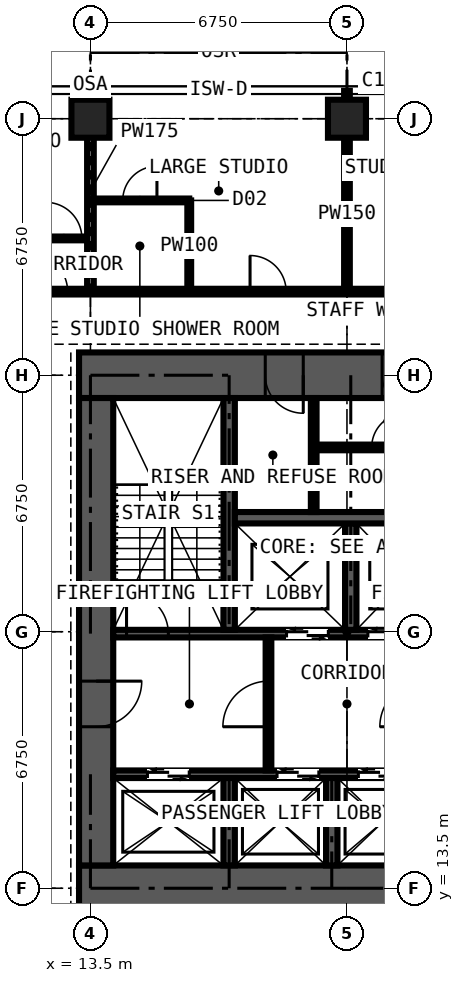
"""IFC4 building model, lengths in metres.
Left out: names, types, materials, properties, quantities, classifications, styles, units other than length and angle.
Written with IfcOpenShell. Run it as: python <this file> out.ifc"""

import sys

from ifc_helpers import new_model, si_unit, direction, frame, frame_2d, origin, origin_2d, place, context, subcontext, project, spatial, rectangle, extrude, element, fill, save


model = new_model("IFC4")
c1 = context("Model", 3, precision=1e-05, world=origin(), true_north=direction((0.0, 1.0)))
c2 = subcontext(c1, "Body", "Model", "MODEL_VIEW")
j1 = project(units=[si_unit("LENGTHUNIT", "METRE"), si_unit("PLANEANGLEUNIT", "RADIAN")], contexts=[c1])
p1 = place(None, origin())
s1 = spatial("IfcSite", under=j1, at=p1, CompositionType="ELEMENT")
p2 = place(p1, origin())
s2 = spatial("IfcBuilding", under=s1, at=p2, CompositionType="ELEMENT")
p3 = place(p2, frame((0.0, 0.0, 229.5)))
s3 = spatial("IfcBuildingStorey", under=s2, at=p3, CompositionType="ELEMENT", Elevation=229.5)
for number, where, z_axis, x_axis in (
    (1, (13.5, 33.75, 0.0), (0.0, 0.0, 1.0), (1.0, 0.0, 0.0)),
    (2, (20.25, 33.75, 0.0), (0.0, 0.0, 1.0), (1.0, 0.0, 0.0)),
):
    element("IfcColumn", number, at=place(p3, frame(where, z_axis=z_axis, x_axis=x_axis)), inside=s3, PredefinedType="COLUMN", context=c2, shape_type="SweptSolid", body=[
        extrude(rectangle(XDim=1.0, YDim=1.0, at=origin_2d()), origin(), (0.0, 0.0, 1.0), 3.6),
    ])
p4 = place(p3, frame((13.2, 13.5, 0.0), z_axis=(0.0, 0.0, 1.0), x_axis=(1.0, 0.0, 0.0)))
e3 = element("IfcWall", 3, at=p4, inside=s3, PredefinedType="SHEAR", context=c2, shape_type="SweptSolid", body=[
    extrude(rectangle(XDim=14.1, YDim=1.2, at=frame_2d((7.05, 0.0))), origin(), (0.0, 0.0, 1.0), 3.6),
])
p5 = place(p3, frame((27.3, 27.0, 0.0), z_axis=(0.0, 0.0, 1.0), x_axis=(-1.0, 0.0, 0.0)))
e4 = element("IfcWall", 4, at=p5, inside=s3, PredefinedType="SHEAR", context=c2, shape_type="SweptSolid", body=[
    extrude(rectangle(XDim=14.1, YDim=1.2, at=frame_2d((7.05, 0.0))), origin(), (0.0, 0.0, 1.0), 3.6),
])
p6 = place(p5, frame((5.225, 0.0, 0.0)))
e5 = element("IfcOpeningElement", 5, at=p6, cuts=e4, PredefinedType="OPENING", context=c2, shape_type="SweptSolid", body=[
    extrude(rectangle(XDim=0.9, YDim=2.2, at=frame_2d((0.45, 1.1))), frame((0.0, 0.61, 0.0), z_axis=(0.0, -1.0, 0.0), x_axis=(1.0, 0.0, 0.0)), (0.0, 0.0, 1.0), 1.22),
])
p7 = place(p5, frame((8.2, 0.0, 0.0)))
e6 = element("IfcOpeningElement", 6, at=p7, cuts=e4, PredefinedType="OPENING", context=c2, shape_type="SweptSolid", body=[
    extrude(rectangle(XDim=1.0, YDim=2.2, at=frame_2d((0.5, 1.1))), frame((0.0, 0.61, 0.0), z_axis=(0.0, -1.0, 0.0), x_axis=(1.0, 0.0, 0.0)), (0.0, 0.0, 1.0), 1.22),
])
p8 = place(p3, frame((13.65, 26.4, 0.0), z_axis=(0.0, 0.0, 1.0), x_axis=(0.0, -1.0, 0.0)))
e7 = element("IfcWall", 7, at=p8, inside=s3, PredefinedType="SHEAR", context=c2, shape_type="SweptSolid", body=[
    extrude(rectangle(XDim=12.3, YDim=0.9, at=frame_2d((6.15, 0.0))), origin(), (0.0, 0.0, 1.0), 3.6),
])
p9 = place(p8, frame((7.45, 0.0, 0.0)))
e8 = element("IfcOpeningElement", 8, at=p9, cuts=e7, PredefinedType="OPENING", context=c2, shape_type="SweptSolid", body=[
    extrude(rectangle(XDim=1.2, YDim=2.2, at=frame_2d((0.6, 1.1))), frame((0.0, 0.46, 0.0), z_axis=(0.0, -1.0, 0.0), x_axis=(1.0, 0.0, 0.0)), (0.0, 0.0, 1.0), 0.92),
])
p10 = place(p3, frame((14.1, 16.5, 0.0), z_axis=(0.0, 0.0, 1.0), x_axis=(1.0, 0.0, 0.0)))
e9 = element("IfcWall", 9, at=p10, inside=s3, PredefinedType="SHEAR", context=c2, shape_type="SweptSolid", body=[
    extrude(rectangle(XDim=12.3, YDim=0.2, at=frame_2d((6.15, 0.0))), origin(), (0.0, 0.0, 1.0), 3.6),
])
p11 = place(p10, frame((0.9, 0.0, 0.0)))
e10 = element("IfcOpeningElement", 10, at=p11, cuts=e9, PredefinedType="OPENING", context=c2, shape_type="SweptSolid", body=[
    extrude(rectangle(XDim=1.1, YDim=2.2, at=frame_2d((0.55, 1.1))), frame((0.0, 0.11, 0.0), z_axis=(0.0, -1.0, 0.0), x_axis=(1.0, 0.0, 0.0)), (0.0, 0.0, 1.0), 0.22),
])
p12 = place(p10, frame((4.31, 0.0, 0.0)))
e11 = element("IfcOpeningElement", 11, at=p12, cuts=e9, PredefinedType="OPENING", context=c2, shape_type="SweptSolid", body=[
    extrude(rectangle(XDim=1.1, YDim=2.2, at=frame_2d((0.55, 1.1))), frame((0.0, 0.11, 0.0), z_axis=(0.0, -1.0, 0.0), x_axis=(1.0, 0.0, 0.0)), (0.0, 0.0, 1.0), 0.22),
])
p13 = place(p10, frame((6.45, 0.0, 0.0)))
e12 = element("IfcOpeningElement", 12, at=p13, cuts=e9, PredefinedType="OPENING", context=c2, shape_type="SweptSolid", body=[
    extrude(rectangle(XDim=1.1, YDim=2.2, at=frame_2d((0.55, 1.1))), frame((0.0, 0.11, 0.0), z_axis=(0.0, -1.0, 0.0), x_axis=(1.0, 0.0, 0.0)), (0.0, 0.0, 1.0), 0.22),
])
p14 = place(p10, frame((9.5, 0.0, 0.0)))
e13 = element("IfcOpeningElement", 13, at=p14, cuts=e9, PredefinedType="OPENING", context=c2, shape_type="SweptSolid", body=[
    extrude(rectangle(XDim=1.1, YDim=2.2, at=frame_2d((0.55, 1.1))), frame((0.0, 0.11, 0.0), z_axis=(0.0, -1.0, 0.0), x_axis=(1.0, 0.0, 0.0)), (0.0, 0.0, 1.0), 0.22),
])
p15 = place(p3, frame((14.1, 20.2, 0.0), z_axis=(0.0, 0.0, 1.0), x_axis=(1.0, 0.0, 0.0)))
e14 = element("IfcWall", 14, at=p15, inside=s3, PredefinedType="SHEAR", context=c2, shape_type="SweptSolid", body=[
    extrude(rectangle(XDim=12.3, YDim=0.2, at=frame_2d((6.15, 0.0))), origin(), (0.0, 0.0, 1.0), 3.6),
])
p16 = place(p15, frame((4.56, 0.0, 0.0)))
e15 = element("IfcOpeningElement", 15, at=p16, cuts=e14, PredefinedType="OPENING", context=c2, shape_type="SweptSolid", body=[
    extrude(rectangle(XDim=1.1, YDim=2.2, at=frame_2d((0.55, 1.1))), frame((0.0, 0.11, 0.0), z_axis=(0.0, -1.0, 0.0), x_axis=(1.0, 0.0, 0.0)), (0.0, 0.0, 1.0), 0.22),
])
p17 = place(p15, frame((6.7, 0.0, 0.0)))
e16 = element("IfcOpeningElement", 16, at=p17, cuts=e14, PredefinedType="OPENING", context=c2, shape_type="SweptSolid", body=[
    extrude(rectangle(XDim=1.1, YDim=2.2, at=frame_2d((0.55, 1.1))), frame((0.0, 0.11, 0.0), z_axis=(0.0, -1.0, 0.0), x_axis=(1.0, 0.0, 0.0)), (0.0, 0.0, 1.0), 0.22),
])
p18 = place(p15, frame((0.35, 0.0, 0.0)))
e17 = element("IfcOpeningElement", 17, at=p18, cuts=e14, PredefinedType="OPENING", context=c2, shape_type="SweptSolid", body=[
    extrude(rectangle(XDim=1.1, YDim=2.2, at=frame_2d((0.55, 1.1))), frame((0.0, 0.11, 0.0), z_axis=(0.0, -1.0, 0.0), x_axis=(1.0, 0.0, 0.0)), (0.0, 0.0, 1.0), 0.22),
])
p19 = place(p15, frame((9.75, 0.0, 0.0)))
e18 = element("IfcOpeningElement", 18, at=p19, cuts=e14, PredefinedType="OPENING", context=c2, shape_type="SweptSolid", body=[
    extrude(rectangle(XDim=1.1, YDim=2.2, at=frame_2d((0.55, 1.1))), frame((0.0, 0.11, 0.0), z_axis=(0.0, -1.0, 0.0), x_axis=(1.0, 0.0, 0.0)), (0.0, 0.0, 1.0), 0.22),
])
p20 = place(p3, frame((17.15, 20.3, 0.0), z_axis=(0.0, 0.0, 1.0), x_axis=(0.0, 1.0, 0.0)))
e19 = element("IfcWall", 19, at=p20, inside=s3, PredefinedType="SHEAR", context=c2, shape_type="SweptSolid", body=[
    extrude(rectangle(XDim=6.1, YDim=0.3, at=frame_2d((3.05, 0.0))), origin(), (0.0, 0.0, 1.0), 3.6),
])
p21 = place(p3, frame((20.35, 20.3, 0.0), z_axis=(0.0, 0.0, 1.0), x_axis=(0.0, 1.0, 0.0)))
e20 = element("IfcWall", 20, at=p21, inside=s3, PredefinedType="SHEAR", context=c2, shape_type="SweptSolid", body=[
    extrude(rectangle(XDim=2.8, YDim=0.3, at=frame_2d((1.4, 0.0))), origin(), (0.0, 0.0, 1.0), 3.6),
])
p22 = place(p3, frame((17.3, 23.25, 0.0), z_axis=(0.0, 0.0, 1.0), x_axis=(1.0, 0.0, 0.0)))
e21 = element("IfcWall", 21, at=p22, inside=s3, PredefinedType="SHEAR", context=c2, shape_type="SweptSolid", body=[
    extrude(rectangle(XDim=5.9, YDim=0.3, at=frame_2d((2.95, 0.0))), origin(), (0.0, 0.0, 1.0), 3.6),
])
for number, where, z_axis, x_axis in (
    (22, (17.15, 14.1, 0.0), (0.0, 0.0, 1.0), (0.0, 1.0, 0.0)),
    (23, (19.85, 14.1, 0.0), (0.0, 0.0, 1.0), (0.0, 1.0, 0.0)),
):
    element("IfcWall", number, at=place(p3, frame(where, z_axis=z_axis, x_axis=x_axis)), inside=s3, PredefinedType="SHEAR", context=c2, shape_type="SweptSolid", body=[
        extrude(rectangle(XDim=2.3, YDim=0.3, at=frame_2d((1.15, 0.0))), origin(), (0.0, 0.0, 1.0), 3.6),
    ])
p23 = place(p3, frame((18.185, 16.6, 0.0), z_axis=(0.0, 0.0, 1.0), x_axis=(0.0, 1.0, 0.0)))
e24 = element("IfcWall", 24, at=p23, inside=s3, PredefinedType="PARTITIONING", context=c2, shape_type="SweptSolid", body=[
    extrude(rectangle(XDim=3.5, YDim=0.15, at=frame_2d((1.75, 0.0))), origin(), (0.0, 0.0, 1.0), 3.375),
])
p24 = place(p23, frame((1.15, 0.0, 0.0)))
e25 = element("IfcOpeningElement", 25, at=p24, cuts=e24, PredefinedType="OPENING", context=c2, shape_type="SweptSolid", body=[
    extrude(rectangle(XDim=1.2, YDim=2.2, at=frame_2d((0.6, 1.1))), frame((0.0, 0.085, 0.0), z_axis=(0.0, -1.0, 0.0), x_axis=(1.0, 0.0, 0.0)), (0.0, 0.0, 1.0), 0.17),
])
p25 = place(p3, frame((19.375, 23.4, 0.0), z_axis=(0.0, 0.0, 1.0), x_axis=(0.0, 1.0, 0.0)))
e26 = element("IfcWall", 26, at=p25, inside=s3, PredefinedType="PARTITIONING", context=c2, shape_type="SweptSolid", body=[
    extrude(rectangle(XDim=3.0, YDim=0.15, at=frame_2d((1.5, 0.0))), origin(), (0.0, 0.0, 1.0), 3.375),
])
p26 = place(p3, frame((19.45, 25.1, 0.0), z_axis=(0.0, 0.0, 1.0), x_axis=(1.0, 0.0, 0.0)))
e27 = element("IfcWall", 27, at=p26, inside=s3, PredefinedType="PARTITIONING", context=c2, shape_type="SweptSolid", body=[
    extrude(rectangle(XDim=3.75, YDim=0.15, at=frame_2d((1.875, 0.0))), origin(), (0.0, 0.0, 1.0), 3.375),
])
p27 = place(p26, frame((1.45, 0.0, 0.0)))
e28 = element("IfcOpeningElement", 28, at=p27, cuts=e27, PredefinedType="OPENING", context=c2, shape_type="SweptSolid", body=[
    extrude(rectangle(XDim=0.9, YDim=2.2, at=frame_2d((0.45, 1.1))), frame((0.0, 0.085, 0.0), z_axis=(0.0, -1.0, 0.0), x_axis=(1.0, 0.0, 0.0)), (0.0, 0.0, 1.0), 0.17),
])
p28 = place(p3, frame((10.125, 30.6, 0.0), z_axis=(0.0, 0.0, 1.0), x_axis=(1.0, 0.0, 0.0)))
e29 = element("IfcWall", 29, at=p28, inside=s3, PredefinedType="PARTITIONING", context=c2, shape_type="SweptSolid", body=[
    extrude(rectangle(XDim=3.375, YDim=0.1, at=frame_2d((1.688, 0.0))), origin(), (0.0, 0.0, 1.0), 3.375),
])
p29 = place(p28, frame((2.2, 0.0, 0.0)))
e30 = element("IfcOpeningElement", 30, at=p29, cuts=e29, PredefinedType="OPENING", context=c2, shape_type="SweptSolid", body=[
    extrude(rectangle(XDim=0.95, YDim=2.2, at=frame_2d((0.475, 1.1))), frame((0.0, 0.06, 0.0), z_axis=(0.0, -1.0, 0.0), x_axis=(1.0, 0.0, 0.0)), (0.0, 0.0, 1.0), 0.12),
])
p30 = place(p3, frame((11.3, 29.2, 0.0), z_axis=(0.0, 0.0, 1.0), x_axis=(1.0, 0.0, 0.0)))
e31 = element("IfcWall", 31, at=p30, inside=s3, PredefinedType="PARTITIONING", context=c2, shape_type="SweptSolid", body=[
    extrude(rectangle(XDim=19.809, YDim=0.15, at=frame_2d((9.904, 0.0))), origin(), (0.0, 0.0, 1.0), 3.375),
])
p31 = place(p30, frame((12.9, 0.0, 0.0)))
e32 = element("IfcOpeningElement", 32, at=p31, cuts=e31, PredefinedType="OPENING", context=c2, shape_type="SweptSolid", body=[
    extrude(rectangle(XDim=1.0, YDim=2.2, at=frame_2d((0.5, 1.1))), frame((0.0, 0.085, 0.0), z_axis=(0.0, -1.0, 0.0), x_axis=(1.0, 0.0, 0.0)), (0.0, 0.0, 1.0), 0.17),
])
p32 = place(p30, frame((6.4, 0.0, 0.0)))
e33 = element("IfcOpeningElement", 33, at=p32, cuts=e31, PredefinedType="OPENING", context=c2, shape_type="SweptSolid", body=[
    extrude(rectangle(XDim=0.95, YDim=2.2, at=frame_2d((0.475, 1.1))), frame((0.0, 0.085, 0.0), z_axis=(0.0, -1.0, 0.0), x_axis=(1.0, 0.0, 0.0)), (0.0, 0.0, 1.0), 0.17),
])
p33 = place(p30, frame((0.6, 0.0, 0.0)))
e34 = element("IfcOpeningElement", 34, at=p33, cuts=e31, PredefinedType="OPENING", context=c2, shape_type="SweptSolid", body=[
    extrude(rectangle(XDim=1.0, YDim=2.2, at=frame_2d((0.5, 1.1))), frame((0.0, 0.085, 0.0), z_axis=(0.0, -1.0, 0.0), x_axis=(1.0, 0.0, 0.0)), (0.0, 0.0, 1.0), 0.17),
])
p34 = place(p3, frame((13.5, 29.2, 0.0), z_axis=(0.0, 0.0, 1.0), x_axis=(0.0, 1.0, 0.0)))
e35 = element("IfcWall", 35, at=p34, inside=s3, PredefinedType="PARTITIONING", context=c2, shape_type="SweptSolid", body=[
    extrude(rectangle(XDim=5.284, YDim=0.175, at=frame_2d((2.642, 0.0))), origin(), (0.0, 0.0, 1.0), 2.61),
])
p35 = place(p3, frame((13.5, 31.6, 0.0), z_axis=(0.0, 0.0, 1.0), x_axis=(1.0, 0.0, 0.0)))
e36 = element("IfcWall", 36, at=p35, inside=s3, PredefinedType="PARTITIONING", context=c2, shape_type="SweptSolid", body=[
    extrude(rectangle(XDim=2.6, YDim=0.1, at=frame_2d((1.3, 0.0))), origin(), (0.0, 0.0, 1.0), 3.375),
])
p36 = place(p35, frame((0.85, 0.0, 0.0)))
e37 = element("IfcOpeningElement", 37, at=p36, cuts=e36, PredefinedType="OPENING", context=c2, shape_type="SweptSolid", body=[
    extrude(rectangle(XDim=0.9, YDim=2.2, at=frame_2d((0.45, 1.1))), frame((0.0, 0.06, 0.0), z_axis=(0.0, -1.0, 0.0), x_axis=(1.0, 0.0, 0.0)), (0.0, 0.0, 1.0), 0.12),
])
p37 = place(p3, frame((16.1, 29.2, 0.0), z_axis=(0.0, 0.0, 1.0), x_axis=(0.0, 1.0, 0.0)))
e38 = element("IfcWall", 38, at=p37, inside=s3, PredefinedType="PARTITIONING", context=c2, shape_type="SweptSolid", body=[
    extrude(rectangle(XDim=2.4, YDim=0.1, at=frame_2d((1.2, 0.0))), origin(), (0.0, 0.0, 1.0), 3.375),
])
p38 = place(p3, frame((20.25, 29.2, 0.0), z_axis=(0.0, 0.0, 1.0), x_axis=(0.0, 1.0, 0.0)))
e39 = element("IfcWall", 39, at=p38, inside=s3, PredefinedType="PARTITIONING", context=c2, shape_type="SweptSolid", body=[
    extrude(rectangle(XDim=5.284, YDim=0.15, at=frame_2d((2.642, 0.0))), origin(), (0.0, 0.0, 1.0), 2.61),
])
p39 = place(p11, origin())
e40 = element("IfcDoor", 40, at=p39, inside=s3, OperationType="DOUBLE_DOOR_SLIDING", PredefinedType="DOOR", context=c2, shape_type="SweptSolid", body=[
    extrude(rectangle(XDim=1.1, YDim=2.2, at=frame_2d((0.55, 1.1))), frame((0.0, 0.025, 0.0), z_axis=(0.0, -1.0, 0.0), x_axis=(1.0, 0.0, 0.0)), (0.0, 0.0, 1.0), 0.05),
])
fill(e10, e40)
p40 = place(p12, origin())
e41 = element("IfcDoor", 41, at=p40, inside=s3, OperationType="DOUBLE_DOOR_SLIDING", PredefinedType="DOOR", context=c2, shape_type="SweptSolid", body=[
    extrude(rectangle(XDim=1.1, YDim=2.2, at=frame_2d((0.55, 1.1))), frame((0.0, 0.025, 0.0), z_axis=(0.0, -1.0, 0.0), x_axis=(1.0, 0.0, 0.0)), (0.0, 0.0, 1.0), 0.05),
])
fill(e11, e41)
p41 = place(p13, origin())
e42 = element("IfcDoor", 42, at=p41, inside=s3, OperationType="DOUBLE_DOOR_SLIDING", PredefinedType="DOOR", context=c2, shape_type="SweptSolid", body=[
    extrude(rectangle(XDim=1.1, YDim=2.2, at=frame_2d((0.55, 1.1))), frame((0.0, 0.025, 0.0), z_axis=(0.0, -1.0, 0.0), x_axis=(1.0, 0.0, 0.0)), (0.0, 0.0, 1.0), 0.05),
])
fill(e12, e42)
p42 = place(p16, origin())
e43 = element("IfcDoor", 43, at=p42, inside=s3, OperationType="DOUBLE_DOOR_SLIDING", PredefinedType="DOOR", context=c2, shape_type="SweptSolid", body=[
    extrude(rectangle(XDim=1.1, YDim=2.2, at=frame_2d((0.55, 1.1))), frame((0.0, 0.025, 0.0), z_axis=(0.0, -1.0, 0.0), x_axis=(1.0, 0.0, 0.0)), (0.0, 0.0, 1.0), 0.05),
])
fill(e15, e43)
p43 = place(p17, origin())
e44 = element("IfcDoor", 44, at=p43, inside=s3, OperationType="DOUBLE_DOOR_SLIDING", PredefinedType="DOOR", context=c2, shape_type="SweptSolid", body=[
    extrude(rectangle(XDim=1.1, YDim=2.2, at=frame_2d((0.55, 1.1))), frame((0.0, 0.025, 0.0), z_axis=(0.0, -1.0, 0.0), x_axis=(1.0, 0.0, 0.0)), (0.0, 0.0, 1.0), 0.05),
])
fill(e16, e44)
p44 = place(p9, origin())
e45 = element("IfcDoor", 45, at=p44, inside=s3, OperationType="DOUBLE_DOOR_SINGLE_SWING", PredefinedType="DOOR", context=c2, shape_type="SweptSolid", body=[
    extrude(rectangle(XDim=1.2, YDim=2.2, at=frame_2d((0.6, 1.1))), frame((0.0, 0.025, 0.0), z_axis=(0.0, -1.0, 0.0), x_axis=(1.0, 0.0, 0.0)), (0.0, 0.0, 1.0), 0.05),
])
fill(e8, e45)
p45 = place(p24, origin())
e46 = element("IfcDoor", 46, at=p45, inside=s3, OperationType="DOUBLE_DOOR_SINGLE_SWING", PredefinedType="DOOR", context=c2, shape_type="SweptSolid", body=[
    extrude(rectangle(XDim=1.2, YDim=2.2, at=frame_2d((0.6, 1.1))), frame((0.0, 0.025, 0.0), z_axis=(0.0, -1.0, 0.0), x_axis=(1.0, 0.0, 0.0)), (0.0, 0.0, 1.0), 0.05),
])
fill(e25, e46)
p46 = place(p27, origin())
e47 = element("IfcDoor", 47, at=p46, inside=s3, OperationType="SINGLE_SWING_RIGHT", PredefinedType="DOOR", context=c2, shape_type="SweptSolid", body=[
    extrude(rectangle(XDim=0.9, YDim=2.2, at=frame_2d((0.45, 1.1))), frame((0.0, 0.025, 0.0), z_axis=(0.0, -1.0, 0.0), x_axis=(1.0, 0.0, 0.0)), (0.0, 0.0, 1.0), 0.05),
])
fill(e28, e47)
p47 = place(p6, origin())
e48 = element("IfcDoor", 48, at=p47, inside=s3, OperationType="SINGLE_SWING_LEFT", PredefinedType="DOOR", context=c2, shape_type="SweptSolid", body=[
    extrude(rectangle(XDim=0.9, YDim=2.2, at=frame_2d((0.45, 1.1))), frame((0.0, 0.4, 0.0), z_axis=(0.0, -1.0, 0.0), x_axis=(1.0, 0.0, 0.0)), (0.0, 0.0, 1.0), 0.8),
])
fill(e5, e48)
p48 = place(p7, origin())
e49 = element("IfcDoor", 49, at=p48, inside=s3, OperationType="SINGLE_SWING_LEFT", PredefinedType="DOOR", context=c2, shape_type="SweptSolid", body=[
    extrude(rectangle(XDim=1.0, YDim=2.2, at=frame_2d((0.5, 1.1))), frame((0.0, 0.025, 0.0), z_axis=(0.0, -1.0, 0.0), x_axis=(1.0, 0.0, 0.0)), (0.0, 0.0, 1.0), 0.05),
])
fill(e6, e49)
p49 = place(p18, origin())
e50 = element("IfcDoor", 50, at=p49, inside=s3, OperationType="SINGLE_SWING_LEFT", PredefinedType="DOOR", context=c2, shape_type="SweptSolid", body=[
    extrude(rectangle(XDim=1.1, YDim=2.2, at=frame_2d((0.55, 1.1))), frame((0.0, 0.025, 0.0), z_axis=(0.0, -1.0, 0.0), x_axis=(1.0, 0.0, 0.0)), (0.0, 0.0, 1.0), 0.05),
])
fill(e17, e50)
p50 = place(p32, origin())
e51 = element("IfcDoor", 51, at=p50, inside=s3, OperationType="SINGLE_SWING_LEFT", PredefinedType="DOOR", context=c2, shape_type="SweptSolid", body=[
    extrude(rectangle(XDim=0.95, YDim=2.2, at=frame_2d((0.475, 1.1))), frame((0.0, 0.025, 0.0), z_axis=(0.0, -1.0, 0.0), x_axis=(1.0, 0.0, 0.0)), (0.0, 0.0, 1.0), 0.05),
])
fill(e33, e51)
p51 = place(p36, origin())
e52 = element("IfcDoor", 52, at=p51, inside=s3, OperationType="SINGLE_SWING_RIGHT", PredefinedType="DOOR", context=c2, shape_type="SweptSolid", body=[
    extrude(rectangle(XDim=0.9, YDim=2.2, at=frame_2d((0.45, 1.1))), frame((0.0, 0.025, 0.0), z_axis=(0.0, -1.0, 0.0), x_axis=(1.0, 0.0, 0.0)), (0.0, 0.0, 1.0), 0.05),
])
fill(e37, e52)
p52 = place(p29, origin())
e53 = element("IfcDoor", 53, at=p52, inside=s3, OperationType="SINGLE_SWING_LEFT", PredefinedType="DOOR", context=c2, shape_type="SweptSolid", body=[
    extrude(rectangle(XDim=0.95, YDim=2.2, at=frame_2d((0.475, 1.1))), frame((0.0, 0.025, 0.0), z_axis=(0.0, -1.0, 0.0), x_axis=(1.0, 0.0, 0.0)), (0.0, 0.0, 1.0), 0.05),
])
fill(e30, e53)
p53 = place(p33, origin())
e54 = element("IfcDoor", 54, at=p53, inside=s3, OperationType="SINGLE_SWING_LEFT", PredefinedType="DOOR", context=c2, shape_type="SweptSolid", body=[
    extrude(rectangle(XDim=1.0, YDim=2.2, at=frame_2d((0.5, 1.1))), frame((0.0, 0.025, 0.0), z_axis=(0.0, -1.0, 0.0), x_axis=(1.0, 0.0, 0.0)), (0.0, 0.0, 1.0), 0.05),
])
fill(e34, e54)
save(model, sys.argv[1])
